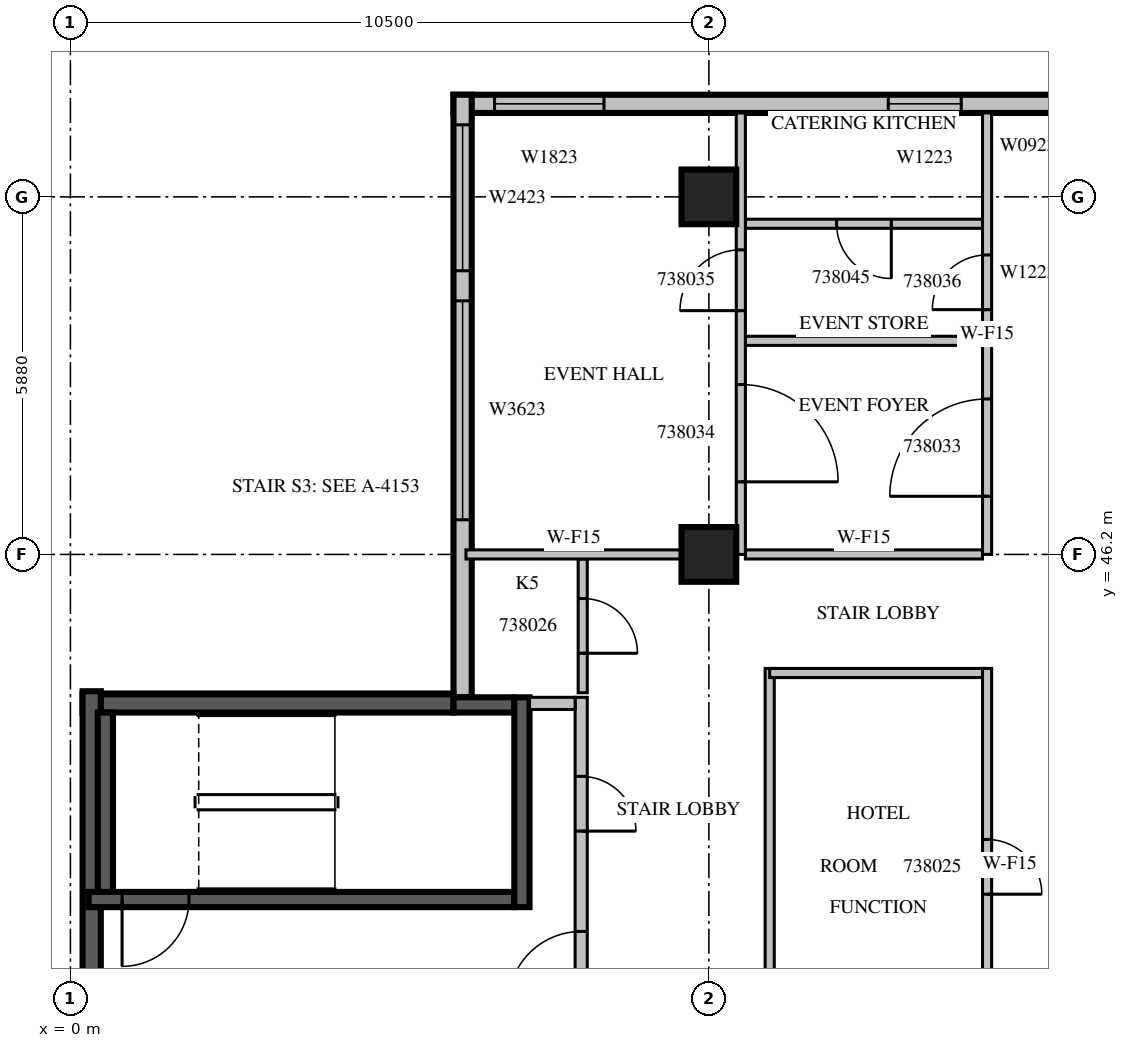
"""IFC4 building model, lengths in metres.
Left out: names, types, materials, properties, quantities, classifications, styles, units other than length and angle.
Written with IfcOpenShell. Run it as: python <this file> out.ifc"""

import sys

from ifc_helpers import new_model, si_unit, direction, frame, frame_2d, origin, origin_2d, place, context, subcontext, project, spatial, rectangle, extrude, source, transform, mapped, element, fill, save


model = new_model("IFC4")
c1 = context("Model", 3, precision=1e-05, world=origin(), true_north=direction((0.0, 1.0)))
c2 = subcontext(c1, "Body", "Model", "MODEL_VIEW")
j1 = project(units=[si_unit("LENGTHUNIT", "METRE"), si_unit("PLANEANGLEUNIT", "RADIAN")], contexts=[c1])
p1 = place(None, origin())
s1 = spatial("IfcSite", under=j1, at=p1, CompositionType="ELEMENT")
p2 = place(p1, origin())
s2 = spatial("IfcBuilding", under=s1, at=p2, CompositionType="ELEMENT")
p3 = place(p2, frame((0.0, 0.0, 177.8)))
s3 = spatial("IfcBuildingStorey", under=s2, at=p3, CompositionType="ELEMENT", Elevation=177.8)
m1 = source(origin(), c2, "Body", "SweptSolid", [
    extrude(rectangle(XDim=0.9, YDim=0.9, at=origin_2d()), origin(), (0.0, 0.0, 1.0), 3.8),
])
for number, where, z_axis, x_axis in (
    (1, (10.5, 46.2, 0.0), (0.0, 0.0, 1.0), (1.0, 0.0, 0.0)),
    (2, (10.5, 52.08, 0.0), (0.0, 0.0, 1.0), (1.0, 0.0, 0.0)),
):
    element("IfcColumn", number, at=place(p3, frame(where, z_axis=z_axis, x_axis=x_axis)), inside=s3, PredefinedType="COLUMN", context=c2, shape_type="MappedRepresentation", body=[
        mapped(m1, transform((0.0, 0.0, 0.0), scale=1.0)),
    ])
p4 = place(p3, frame((16.8, 53.61, 0.0), z_axis=(0.0, 0.0, 1.0), x_axis=(-1.0, 0.0, 0.0)))
e3 = element("IfcWall", 3, at=p4, inside=s3, PredefinedType="STANDARD", context=c2, shape_type="SweptSolid", body=[
    extrude(rectangle(XDim=10.5, YDim=0.3, at=frame_2d((5.25, 0.0))), origin(), (0.0, 0.0, 1.0), 3.4),
])
m2 = source(origin(), c2, "Body", "SweptSolid", [
    extrude(rectangle(XDim=1.2, YDim=2.3, at=frame_2d((0.6, 1.15))), frame((0.0, 0.16, 0.0), z_axis=(0.0, -1.0, 0.0), x_axis=(1.0, 0.0, 0.0)), (0.0, 0.0, 1.0), 0.32),
])
p5 = place(p4, frame((2.15, 0.0, 0.6)))
e4 = element("IfcOpeningElement", 4, at=p5, cuts=e3, PredefinedType="OPENING", context=c2, shape_type="MappedRepresentation", body=[
    mapped(m2, transform((0.0, 0.0, 0.0), scale=1.0)),
])
m3 = source(origin(), c2, "Body", "SweptSolid", [
    extrude(rectangle(XDim=1.8, YDim=2.3, at=frame_2d((0.9, 1.15))), frame((0.0, 0.16, 0.0), z_axis=(0.0, -1.0, 0.0), x_axis=(1.0, 0.0, 0.0)), (0.0, 0.0, 1.0), 0.32),
])
p6 = place(p4, frame((8.025, 0.0, 0.6)))
e5 = element("IfcOpeningElement", 5, at=p6, cuts=e3, PredefinedType="OPENING", context=c2, shape_type="MappedRepresentation", body=[
    mapped(m3, transform((0.0, 0.0, 0.0), scale=1.0)),
])
p7 = place(p3, frame((6.45, 53.76, 0.0), z_axis=(0.0, 0.0, 1.0), x_axis=(0.0, -1.0, 0.0)))
e6 = element("IfcWall", 6, at=p7, inside=s3, PredefinedType="STANDARD", context=c2, shape_type="SweptSolid", body=[
    extrude(rectangle(XDim=9.91, YDim=0.3, at=frame_2d((4.955, 0.0))), origin(), (0.0, 0.0, 1.0), 3.4),
])
m4 = source(origin(), c2, "Body", "SweptSolid", [
    extrude(rectangle(XDim=3.6, YDim=2.3, at=frame_2d((1.8, 1.15))), frame((0.0, 0.16, 0.0), z_axis=(0.0, -1.0, 0.0), x_axis=(1.0, 0.0, 0.0)), (0.0, 0.0, 1.0), 0.32),
])
p8 = place(p7, frame((3.39, 0.0, 0.6)))
e7 = element("IfcOpeningElement", 7, at=p8, cuts=e6, PredefinedType="OPENING", context=c2, shape_type="MappedRepresentation", body=[
    mapped(m4, transform((0.0, 0.0, 0.0), scale=1.0)),
])
m5 = source(origin(), c2, "Body", "SweptSolid", [
    extrude(rectangle(XDim=2.4, YDim=2.3, at=frame_2d((1.2, 1.15))), frame((0.0, 0.16, 0.0), z_axis=(0.0, -1.0, 0.0), x_axis=(1.0, 0.0, 0.0)), (0.0, 0.0, 1.0), 0.32),
])
p9 = place(p7, frame((0.495, 0.0, 0.6)))
e8 = element("IfcOpeningElement", 8, at=p9, cuts=e6, PredefinedType="OPENING", context=c2, shape_type="MappedRepresentation", body=[
    mapped(m5, transform((0.0, 0.0, 0.0), scale=1.0)),
])
p10 = place(p3, frame((6.3, 43.75, 0.0), z_axis=(0.0, 0.0, 1.0), x_axis=(-1.0, 0.0, 0.0)))
e9 = element("IfcWall", 9, at=p10, inside=s3, PredefinedType="SOLIDWALL", context=c2, shape_type="SweptSolid", body=[
    extrude(rectangle(XDim=6.1, YDim=0.3, at=frame_2d((3.05, 0.0))), origin(), (0.0, 0.0, 1.0), 3.4),
])
p11 = place(p3, frame((0.35, 43.95, 0.0), z_axis=(0.0, 0.0, 1.0), x_axis=(0.0, -1.0, 0.0)))
e10 = element("IfcWall", 10, at=p11, inside=s3, PredefinedType="SOLIDWALL", context=c2, shape_type="SweptSolid", body=[
    extrude(rectangle(XDim=5.65, YDim=0.3, at=frame_2d((2.825, 0.0))), origin(), (0.0, 0.0, 1.0), 3.4),
])
m6 = source(origin(), c2, "Body", "SweptSolid", [
    extrude(rectangle(XDim=7.0, YDim=0.25, at=frame_2d((3.5, 0.0))), origin(), (0.0, 0.0, 1.0), 3.4),
])
p12 = place(p3, frame((0.3, 40.525, 0.0), z_axis=(0.0, 0.0, 1.0), x_axis=(1.0, 0.0, 0.0)))
e11 = element("IfcWall", 11, at=p12, inside=s3, PredefinedType="SOLIDWALL", context=c2, shape_type="MappedRepresentation", body=[
    mapped(m6, transform((0.0, 0.0, 0.0), scale=1.0)),
])
m7 = source(origin(), c2, "Body", "SweptSolid", [
    extrude(rectangle(XDim=1.1, YDim=2.1, at=frame_2d((0.55, 1.05))), frame((0.0, 0.135, 0.0), z_axis=(0.0, -1.0, 0.0), x_axis=(1.0, 0.0, 0.0)), (0.0, 0.0, 1.0), 0.27),
])
p13 = place(p12, frame((0.55, 0.0, 0.0)))
e12 = element("IfcOpeningElement", 12, at=p13, cuts=e11, PredefinedType="OPENING", context=c2, shape_type="MappedRepresentation", body=[
    mapped(m7, transform((0.0, 0.0, 0.0), scale=1.0)),
])
p14 = place(p3, frame((6.3, 43.725, 0.0), z_axis=(0.0, 0.0, 1.0), x_axis=(1.0, 0.0, 0.0)))
e13 = element("IfcWall", 13, at=p14, inside=s3, PredefinedType="SOLIDWALL", context=c2, shape_type="SweptSolid", body=[
    extrude(rectangle(XDim=1.0, YDim=0.25, at=frame_2d((0.5, 0.0))), origin(), (0.0, 0.0, 1.0), 3.4),
])
m8 = source(origin(), c2, "Body", "SweptSolid", [
    extrude(rectangle(XDim=3.45, YDim=0.25, at=frame_2d((1.725, 0.0))), origin(), (0.0, 0.0, 1.0), 3.4),
])
p15 = place(p3, frame((7.425, 40.4, 0.0), z_axis=(0.0, 0.0, 1.0), x_axis=(0.0, 1.0, 0.0)))
e14 = element("IfcWall", 14, at=p15, inside=s3, PredefinedType="SOLIDWALL", context=c2, shape_type="MappedRepresentation", body=[
    mapped(m8, transform((0.0, 0.0, 0.0), scale=1.0)),
])
m9 = source(origin(), c2, "Body", "SweptSolid", [
    extrude(rectangle(XDim=2.95, YDim=0.25, at=frame_2d((1.475, 0.0))), origin(), (0.0, 0.0, 1.0), 3.4),
])
p16 = place(p3, frame((0.575, 40.65, 0.0), z_axis=(0.0, 0.0, 1.0), x_axis=(0.0, 1.0, 0.0)))
e15 = element("IfcWall", 15, at=p16, inside=s3, PredefinedType="SOLIDWALL", context=c2, shape_type="MappedRepresentation", body=[
    mapped(m9, transform((0.0, 0.0, 0.0), scale=1.0)),
])
m10 = source(origin(), c2, "Body", "SweptSolid", [
    extrude(rectangle(XDim=5.45, YDim=0.2, at=frame_2d((2.725, 0.0))), origin(), (0.0, 0.0, 1.0), 3.4),
])
p17 = place(p3, frame((8.4, 38.4, 0.0), z_axis=(0.0, 0.0, 1.0), x_axis=(0.0, 1.0, 0.0)))
e16 = element("IfcWall", 16, at=p17, inside=s3, PredefinedType="PARTITIONING", context=c2, shape_type="MappedRepresentation", body=[
    mapped(m10, transform((0.0, 0.0, 0.0), scale=1.0)),
])
m11 = source(origin(), c2, "Body", "SweptSolid", [
    extrude(rectangle(XDim=1.2, YDim=2.1, at=frame_2d((0.6, 1.05))), frame((0.0, 0.11, 0.0), z_axis=(0.0, -1.0, 0.0), x_axis=(1.0, 0.0, 0.0)), (0.0, 0.0, 1.0), 0.22),
])
p18 = place(p17, frame((0.4, 0.0, 0.0)))
e17 = element("IfcOpeningElement", 17, at=p18, cuts=e16, PredefinedType="OPENING", context=c2, shape_type="MappedRepresentation", body=[
    mapped(m11, transform((0.0, 0.0, 0.0), scale=1.0)),
])
m12 = source(origin(), c2, "Body", "SweptSolid", [
    extrude(rectangle(XDim=0.9, YDim=2.1, at=frame_2d((0.45, 1.05))), frame((0.0, 0.11, 0.0), z_axis=(0.0, -1.0, 0.0), x_axis=(1.0, 0.0, 0.0)), (0.0, 0.0, 1.0), 0.22),
])
p19 = place(p17, frame((3.25, 0.0, 0.0)))
e18 = element("IfcOpeningElement", 18, at=p19, cuts=e16, PredefinedType="OPENING", context=c2, shape_type="MappedRepresentation", body=[
    mapped(m12, transform((0.0, 0.0, 0.0), scale=1.0)),
])
m13 = source(origin(), c2, "Body", "SweptSolid", [
    extrude(rectangle(XDim=0.75, YDim=0.2, at=frame_2d((0.375, 0.0))), origin(), (0.0, 0.0, 1.0), 3.4),
])
p20 = place(p3, frame((7.55, 43.75, 0.0), z_axis=(0.0, 0.0, 1.0), x_axis=(1.0, 0.0, 0.0)))
e19 = element("IfcWall", 19, at=p20, inside=s3, PredefinedType="PARTITIONING", context=c2, shape_type="MappedRepresentation", body=[
    mapped(m13, transform((0.0, 0.0, 0.0), scale=1.0)),
])
m14 = source(origin(), c2, "Body", "SweptSolid", [
    extrude(rectangle(XDim=6.45, YDim=0.15, at=frame_2d((3.225, 0.0))), origin(), (0.0, 0.0, 1.0), 3.4),
])
p21 = place(p3, frame((11.5, 44.325, 0.0), z_axis=(0.0, 0.0, 1.0), x_axis=(0.0, -1.0, 0.0)))
e20 = element("IfcWall", 20, at=p21, inside=s3, PredefinedType="PARTITIONING", context=c2, shape_type="MappedRepresentation", body=[
    mapped(m14, transform((0.0, 0.0, 0.0), scale=1.0)),
])
p22 = place(p3, frame((15.075, 44.25, 0.0), z_axis=(0.0, 0.0, 1.0), x_axis=(-1.0, 0.0, 0.0)))
e21 = element("IfcWall", 21, at=p22, inside=s3, PredefinedType="PARTITIONING", context=c2, shape_type="SweptSolid", body=[
    extrude(rectangle(XDim=3.575, YDim=0.15, at=frame_2d((1.788, 0.0))), origin(), (0.0, 0.0, 1.0), 3.4),
])
p23 = place(p3, frame((15.075, 37.875, 0.0), z_axis=(0.0, 0.0, 1.0), x_axis=(0.0, 1.0, 0.0)))
e22 = element("IfcWall", 22, at=p23, inside=s3, PredefinedType="PARTITIONING", context=c2, shape_type="MappedRepresentation", body=[
    mapped(m14, transform((0.0, 0.0, 0.0), scale=1.0)),
])
m15 = source(origin(), c2, "Body", "SweptSolid", [
    extrude(rectangle(XDim=0.9, YDim=2.1, at=frame_2d((0.45, 1.05))), frame((0.0, 0.085, 0.0), z_axis=(0.0, -1.0, 0.0), x_axis=(1.0, 0.0, 0.0)), (0.0, 0.0, 1.0), 0.17),
])
p24 = place(p23, frame((2.737, 0.0, 0.0)))
e23 = element("IfcOpeningElement", 23, at=p24, cuts=e22, PredefinedType="OPENING", context=c2, shape_type="MappedRepresentation", body=[
    mapped(m15, transform((0.0, 0.0, 0.0), scale=1.0)),
])
m16 = source(origin(), c2, "Body", "SweptSolid", [
    extrude(rectangle(XDim=2.2, YDim=0.15, at=frame_2d((1.1, 0.0))), origin(), (0.0, 0.0, 1.0), 3.4),
])
p25 = place(p3, frame((8.425, 43.925, 0.0), z_axis=(0.0, 0.0, 1.0), x_axis=(0.0, 1.0, 0.0)))
e24 = element("IfcWall", 24, at=p25, inside=s3, PredefinedType="PARTITIONING", context=c2, shape_type="MappedRepresentation", body=[
    mapped(m16, transform((0.0, 0.0, 0.0), scale=1.0)),
])
p26 = place(p25, frame((0.65, 0.0, 0.0)))
e25 = element("IfcOpeningElement", 25, at=p26, cuts=e24, PredefinedType="OPENING", context=c2, shape_type="MappedRepresentation", body=[
    mapped(m15, transform((0.0, 0.0, 0.0), scale=1.0)),
])
m17 = source(origin(), c2, "Body", "SweptSolid", [
    extrude(rectangle(XDim=3.9, YDim=0.15, at=frame_2d((1.95, 0.0))), origin(), (0.0, 0.0, 1.0), 3.4),
])
p27 = place(p3, frame((15.0, 49.713, 0.0), z_axis=(0.0, 0.0, 1.0), x_axis=(-1.0, 0.0, 0.0)))
e26 = element("IfcWall", 26, at=p27, inside=s3, PredefinedType="PARTITIONING", context=c2, shape_type="MappedRepresentation", body=[
    mapped(m17, transform((0.0, 0.0, 0.0), scale=1.0)),
])
p28 = place(p3, frame((15.0, 51.638, 0.0), z_axis=(0.0, 0.0, 1.0), x_axis=(-1.0, 0.0, 0.0)))
e27 = element("IfcWall", 27, at=p28, inside=s3, PredefinedType="PARTITIONING", context=c2, shape_type="MappedRepresentation", body=[
    mapped(m17, transform((0.0, 0.0, 0.0), scale=1.0)),
])
p29 = place(p28, frame((1.5, 0.0, 0.0)))
e28 = element("IfcOpeningElement", 28, at=p29, cuts=e27, PredefinedType="OPENING", context=c2, shape_type="MappedRepresentation", body=[
    mapped(m15, transform((0.0, 0.0, 0.0), scale=1.0)),
])
m18 = source(origin(), c2, "Body", "SweptSolid", [
    extrude(rectangle(XDim=3.546, YDim=0.15, at=frame_2d((1.773, 0.0))), origin(), (0.0, 0.0, 1.0), 3.4),
])
p30 = place(p3, frame((10.051, 46.2, 0.0), z_axis=(0.0, 0.0, 1.0), x_axis=(-1.0, 0.0, 0.0)))
e29 = element("IfcWall", 29, at=p30, inside=s3, PredefinedType="PARTITIONING", context=c2, shape_type="MappedRepresentation", body=[
    mapped(m18, transform((0.0, 0.0, 0.0), scale=1.0)),
])
p31 = place(p3, frame((15.0, 46.2, 0.0), z_axis=(0.0, 0.0, 1.0), x_axis=(-1.0, 0.0, 0.0)))
e30 = element("IfcWall", 30, at=p31, inside=s3, PredefinedType="PARTITIONING", context=c2, shape_type="MappedRepresentation", body=[
    mapped(m17, transform((0.0, 0.0, 0.0), scale=1.0)),
])
p32 = place(p3, frame((11.025, 46.2, 0.0), z_axis=(0.0, 0.0, 1.0), x_axis=(0.0, 1.0, 0.0)))
e31 = element("IfcWall", 31, at=p32, inside=s3, PredefinedType="PARTITIONING", context=c2, shape_type="SweptSolid", body=[
    extrude(rectangle(XDim=7.26, YDim=0.15, at=frame_2d((3.63, 0.0))), origin(), (0.0, 0.0, 1.0), 3.4),
])
m19 = source(origin(), c2, "Body", "SweptSolid", [
    extrude(rectangle(XDim=1.6, YDim=2.1, at=frame_2d((0.8, 1.05))), frame((0.0, 0.085, 0.0), z_axis=(0.0, -1.0, 0.0), x_axis=(1.0, 0.0, 0.0)), (0.0, 0.0, 1.0), 0.17),
])
p33 = place(p32, frame((1.194, 0.0, 0.0)))
e32 = element("IfcOpeningElement", 32, at=p33, cuts=e31, PredefinedType="OPENING", context=c2, shape_type="MappedRepresentation", body=[
    mapped(m19, transform((0.0, 0.0, 0.0), scale=1.0)),
])
m20 = source(origin(), c2, "Body", "SweptSolid", [
    extrude(rectangle(XDim=1.0, YDim=2.1, at=frame_2d((0.5, 1.05))), frame((0.0, 0.085, 0.0), z_axis=(0.0, -1.0, 0.0), x_axis=(1.0, 0.0, 0.0)), (0.0, 0.0, 1.0), 0.17),
])
p34 = place(p32, frame((4.009, 0.0, 0.0)))
e33 = element("IfcOpeningElement", 33, at=p34, cuts=e31, PredefinedType="OPENING", context=c2, shape_type="MappedRepresentation", body=[
    mapped(m20, transform((0.0, 0.0, 0.0), scale=1.0)),
])
m21 = source(origin(), c2, "Body", "SweptSolid", [
    extrude(rectangle(XDim=7.26, YDim=0.15, at=frame_2d((3.63, 0.0))), origin(), (0.0, 0.0, 1.0), 3.4),
])
p35 = place(p3, frame((15.075, 46.2, 0.0), z_axis=(0.0, 0.0, 1.0), x_axis=(0.0, 1.0, 0.0)))
e34 = element("IfcWall", 34, at=p35, inside=s3, PredefinedType="PARTITIONING", context=c2, shape_type="MappedRepresentation", body=[
    mapped(m21, transform((0.0, 0.0, 0.0), scale=1.0)),
])
p36 = place(p35, frame((0.956, 0.0, 0.0)))
e35 = element("IfcOpeningElement", 35, at=p36, cuts=e34, PredefinedType="OPENING", context=c2, shape_type="SweptSolid", body=[
    extrude(rectangle(XDim=1.6, YDim=2.1, at=frame_2d((0.8, 1.05))), frame((0.0, 0.085, 0.0), z_axis=(0.0, -1.0, 0.0), x_axis=(1.0, 0.0, 0.0)), (0.0, 0.0, 1.0), 0.17),
])
p37 = place(p35, frame((4.025, 0.0, 0.0)))
e36 = element("IfcOpeningElement", 36, at=p37, cuts=e34, PredefinedType="OPENING", context=c2, shape_type="MappedRepresentation", body=[
    mapped(m15, transform((0.0, 0.0, 0.0), scale=1.0)),
])
m22 = source(origin(), c2, "Body", "SweptSolid", [
    extrude(rectangle(XDim=1.2, YDim=2.3, at=frame_2d((0.6, 1.15))), frame((0.0, 0.03, 0.0), z_axis=(0.0, -1.0, 0.0), x_axis=(1.0, 0.0, 0.0)), (0.0, 0.0, 1.0), 0.06),
])
p38 = place(p5, origin())
e37 = element("IfcWindow", 37, at=p38, inside=s3, PartitioningType="SINGLE_PANEL", PredefinedType="WINDOW", context=c2, shape_type="MappedRepresentation", body=[
    mapped(m22, transform((0.0, 0.0, 0.0), scale=1.0)),
])
fill(e4, e37)
m23 = source(origin(), c2, "Body", "SweptSolid", [
    extrude(rectangle(XDim=1.8, YDim=2.3, at=frame_2d((0.9, 1.15))), frame((0.0, 0.03, 0.0), z_axis=(0.0, -1.0, 0.0), x_axis=(1.0, 0.0, 0.0)), (0.0, 0.0, 1.0), 0.06),
])
p39 = place(p6, origin())
e38 = element("IfcWindow", 38, at=p39, inside=s3, PartitioningType="SINGLE_PANEL", PredefinedType="WINDOW", context=c2, shape_type="MappedRepresentation", body=[
    mapped(m23, transform((0.0, 0.0, 0.0), scale=1.0)),
])
fill(e5, e38)
m24 = source(origin(), c2, "Body", "SweptSolid", [
    extrude(rectangle(XDim=3.6, YDim=2.3, at=frame_2d((1.8, 1.15))), frame((0.0, 0.03, 0.0), z_axis=(0.0, -1.0, 0.0), x_axis=(1.0, 0.0, 0.0)), (0.0, 0.0, 1.0), 0.06),
])
p40 = place(p8, origin())
e39 = element("IfcWindow", 39, at=p40, inside=s3, PartitioningType="SINGLE_PANEL", PredefinedType="WINDOW", context=c2, shape_type="MappedRepresentation", body=[
    mapped(m24, transform((0.0, 0.0, 0.0), scale=1.0)),
])
fill(e7, e39)
m25 = source(origin(), c2, "Body", "SweptSolid", [
    extrude(rectangle(XDim=2.4, YDim=2.3, at=frame_2d((1.2, 1.15))), frame((0.0, 0.03, 0.0), z_axis=(0.0, -1.0, 0.0), x_axis=(1.0, 0.0, 0.0)), (0.0, 0.0, 1.0), 0.06),
])
p41 = place(p9, origin())
e40 = element("IfcWindow", 40, at=p41, inside=s3, PartitioningType="SINGLE_PANEL", PredefinedType="WINDOW", context=c2, shape_type="MappedRepresentation", body=[
    mapped(m25, transform((0.0, 0.0, 0.0), scale=1.0)),
])
fill(e8, e40)
m26 = source(origin(), c2, "Body", "SweptSolid", [
    extrude(rectangle(XDim=1.1, YDim=2.1, at=frame_2d((0.55, 1.05))), frame((0.0, 0.025, 0.0), z_axis=(0.0, -1.0, 0.0), x_axis=(1.0, 0.0, 0.0)), (0.0, 0.0, 1.0), 0.05),
])
p42 = place(p13, origin())
e41 = element("IfcDoor", 41, at=p42, inside=s3, OperationType="SINGLE_SWING_RIGHT", PredefinedType="DOOR", context=c2, shape_type="MappedRepresentation", body=[
    mapped(m26, transform((0.0, 0.0, 0.0), scale=1.0)),
])
fill(e12, e41)
m27 = source(origin(), c2, "Body", "SweptSolid", [
    extrude(rectangle(XDim=1.2, YDim=2.1, at=frame_2d((0.6, 1.05))), frame((0.0, 0.025, 0.0), z_axis=(0.0, -1.0, 0.0), x_axis=(1.0, 0.0, 0.0)), (0.0, 0.0, 1.0), 0.05),
])
p43 = place(p18, origin())
e42 = element("IfcDoor", 42, at=p43, inside=s3, OperationType="SINGLE_SWING_LEFT", PredefinedType="DOOR", context=c2, shape_type="MappedRepresentation", body=[
    mapped(m27, transform((0.0, 0.0, 0.0), scale=1.0)),
])
fill(e17, e42)
m28 = source(origin(), c2, "Body", "SweptSolid", [
    extrude(rectangle(XDim=0.9, YDim=2.1, at=frame_2d((0.45, 1.05))), frame((0.0, 0.025, 0.0), z_axis=(0.0, -1.0, 0.0), x_axis=(1.0, 0.0, 0.0)), (0.0, 0.0, 1.0), 0.05),
])
p44 = place(p19, origin())
e43 = element("IfcDoor", 43, at=p44, inside=s3, OperationType="SINGLE_SWING_RIGHT", PredefinedType="DOOR", context=c2, shape_type="MappedRepresentation", body=[
    mapped(m28, transform((0.0, 0.0, 0.0), scale=1.0)),
])
fill(e18, e43)
p45 = place(p24, origin())
e44 = element("IfcDoor", 44, at=p45, inside=s3, OperationType="SINGLE_SWING_RIGHT", PredefinedType="DOOR", context=c2, shape_type="MappedRepresentation", body=[
    mapped(m28, transform((0.0, 0.0, 0.0), scale=1.0)),
])
fill(e23, e44)
p46 = place(p26, origin())
e45 = element("IfcDoor", 45, at=p46, inside=s3, OperationType="SINGLE_SWING_RIGHT", PredefinedType="DOOR", context=c2, shape_type="MappedRepresentation", body=[
    mapped(m28, transform((0.0, 0.0, 0.0), scale=1.0)),
])
fill(e25, e45)
p47 = place(p36, origin())
e46 = element("IfcDoor", 46, at=p47, inside=s3, OperationType="SINGLE_SWING_LEFT", PredefinedType="DOOR", context=c2, shape_type="SweptSolid", body=[
    extrude(rectangle(XDim=1.6, YDim=2.1, at=frame_2d((0.8, 1.05))), frame((0.0, 0.025, 0.0), z_axis=(0.0, -1.0, 0.0), x_axis=(1.0, 0.0, 0.0)), (0.0, 0.0, 1.0), 0.05),
])
fill(e35, e46)
m29 = source(origin(), c2, "Body", "SweptSolid", [
    extrude(rectangle(XDim=1.6, YDim=2.1, at=frame_2d((0.8, 1.05))), frame((0.0, 0.025, 0.0), z_axis=(0.0, -1.0, 0.0), x_axis=(1.0, 0.0, 0.0)), (0.0, 0.0, 1.0), 0.05),
])
p48 = place(p33, origin())
e47 = element("IfcDoor", 47, at=p48, inside=s3, OperationType="SINGLE_SWING_RIGHT", PredefinedType="DOOR", context=c2, shape_type="MappedRepresentation", body=[
    mapped(m29, transform((0.0, 0.0, 0.0), scale=1.0)),
])
fill(e32, e47)
m30 = source(origin(), c2, "Body", "SweptSolid", [
    extrude(rectangle(XDim=1.0, YDim=2.1, at=frame_2d((0.5, 1.05))), frame((0.0, 0.025, 0.0), z_axis=(0.0, -1.0, 0.0), x_axis=(1.0, 0.0, 0.0)), (0.0, 0.0, 1.0), 0.05),
])
p49 = place(p34, origin())
e48 = element("IfcDoor", 48, at=p49, inside=s3, OperationType="SINGLE_SWING_LEFT", PredefinedType="DOOR", context=c2, shape_type="MappedRepresentation", body=[
    mapped(m30, transform((0.0, 0.0, 0.0), scale=1.0)),
])
fill(e33, e48)
p50 = place(p37, origin())
e49 = element("IfcDoor", 49, at=p50, inside=s3, OperationType="SINGLE_SWING_LEFT", PredefinedType="DOOR", context=c2, shape_type="MappedRepresentation", body=[
    mapped(m28, transform((0.0, 0.0, 0.0), scale=1.0)),
])
fill(e36, e49)
p51 = place(p29, origin())
e50 = element("IfcDoor", 50, at=p51, inside=s3, OperationType="SINGLE_SWING_LEFT", PredefinedType="DOOR", context=c2, shape_type="MappedRepresentation", body=[
    mapped(m28, transform((0.0, 0.0, 0.0), scale=1.0)),
])
fill(e28, e50)
save(model, sys.argv[1])
